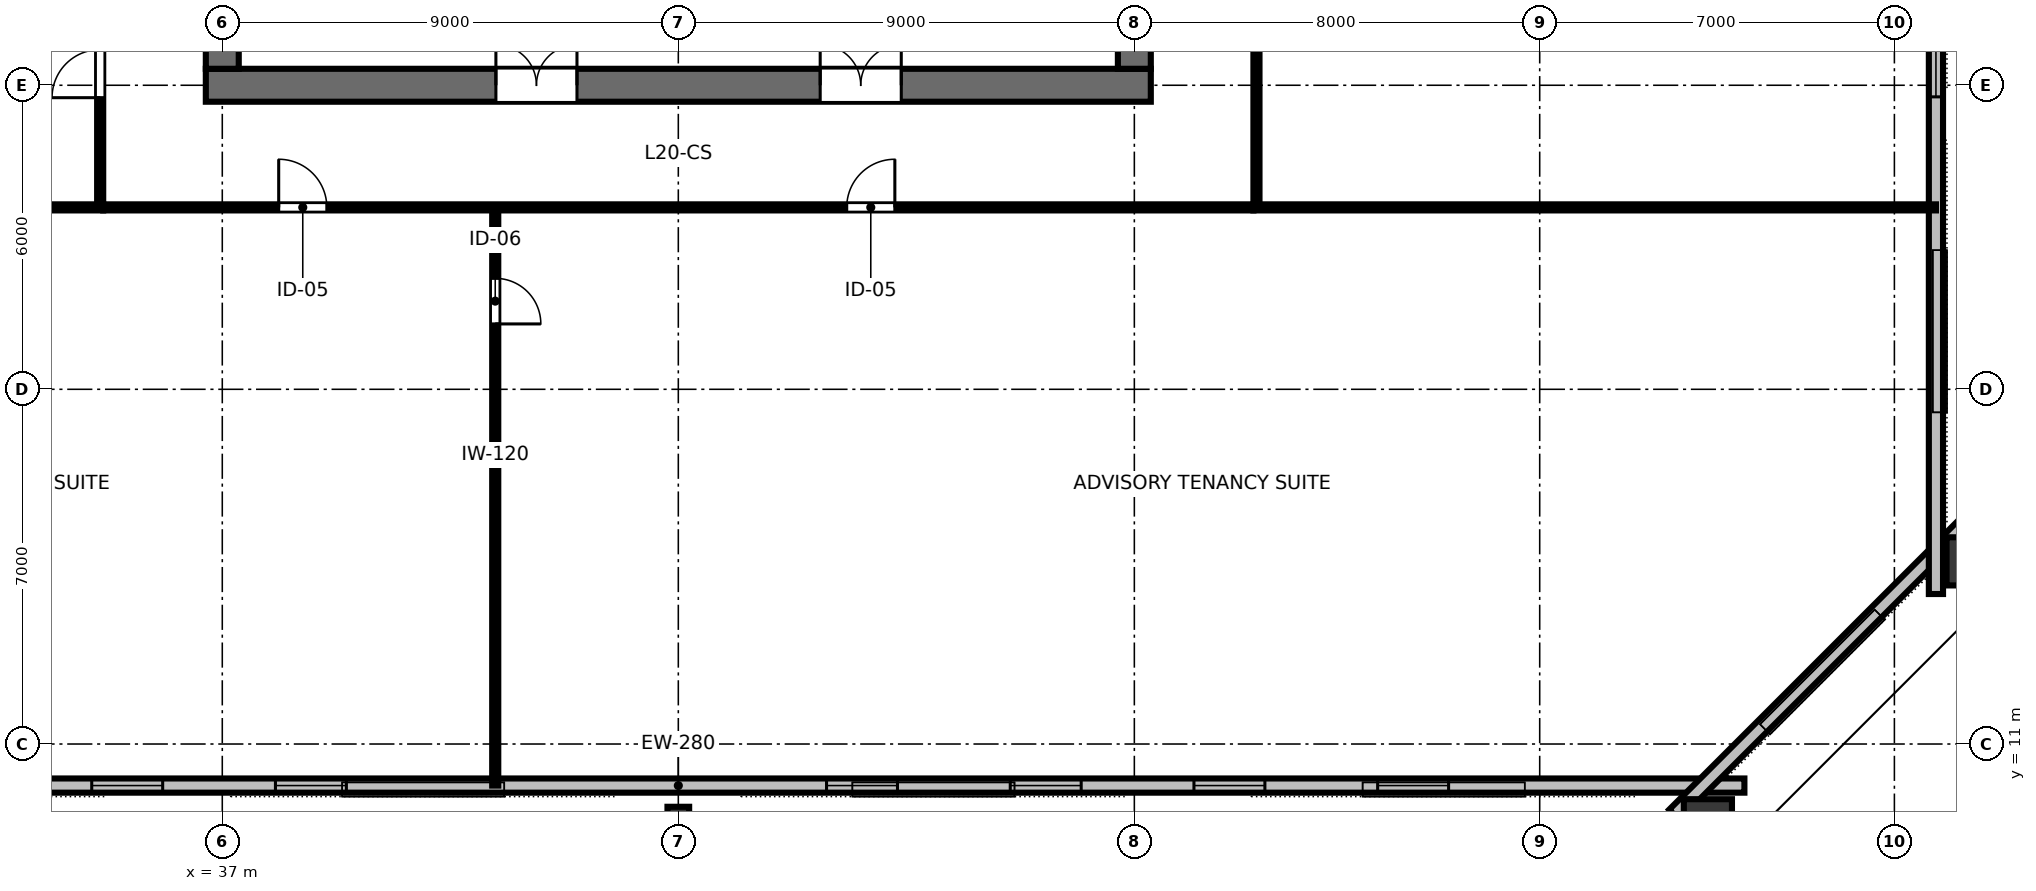
"""IFC4 building model, lengths in metres.
Left out: names, types, materials, properties, quantities, classifications, styles, units other than length and angle.
Written with IfcOpenShell. Run it as: python <this file> out.ifc"""

import sys

from ifc_helpers import new_model, si_unit, direction, frame, frame_2d, origin, origin_2d, place, context, subcontext, project, spatial, rectangle, hollow_rectangle, i_section, extrude, element, fill, save


model = new_model("IFC4")
c1 = context("Model", 3, precision=1e-05, world=origin(), true_north=direction((0.0, 1.0)))
c2 = subcontext(c1, "Body", "Model", "MODEL_VIEW")
j1 = project(units=[si_unit("LENGTHUNIT", "METRE"), si_unit("PLANEANGLEUNIT", "RADIAN")], contexts=[c1])
p1 = place(None, origin())
s1 = spatial("IfcSite", under=j1, at=p1, CompositionType="ELEMENT")
p2 = place(p1, origin())
s2 = spatial("IfcBuilding", under=s1, at=p2, CompositionType="ELEMENT")
p3 = place(p2, frame((0.0, 0.0, 78.4)))
s3 = spatial("IfcBuildingStorey", under=s2, at=p3, CompositionType="ELEMENT", Elevation=78.4)
p4 = place(p3, frame((36.675, 24.0, 0.0), z_axis=(0.0, 0.0, 1.0), x_axis=(1.0, 0.0, 0.0)))
e1 = element("IfcWall", 1, at=p4, inside=s3, PredefinedType="SHEAR", context=c2, shape_type="SweptSolid", body=[
    extrude(rectangle(XDim=18.65, YDim=0.65, at=frame_2d((9.325, 0.0))), origin(), (0.0, 0.0, 1.0), 3.36),
])
p5 = place(p4, frame((5.725, 0.0, 0.0)))
e2 = element("IfcOpeningElement", 2, at=p5, cuts=e1, PredefinedType="OPENING", context=c2, shape_type="SweptSolid", body=[
    extrude(rectangle(XDim=1.6, YDim=2.15, at=frame_2d((0.8, 1.075))), frame((0.0, 0.335, 0.0), z_axis=(0.0, -1.0, 0.0), x_axis=(1.0, 0.0, 0.0)), (0.0, 0.0, 1.0), 0.67),
])
p6 = place(p4, frame((12.125, 0.0, 0.0)))
e3 = element("IfcOpeningElement", 3, at=p6, cuts=e1, PredefinedType="OPENING", context=c2, shape_type="SweptSolid", body=[
    extrude(rectangle(XDim=1.6, YDim=2.15, at=frame_2d((0.8, 1.075))), frame((0.0, 0.335, 0.0), z_axis=(0.0, -1.0, 0.0), x_axis=(1.0, 0.0, 0.0)), (0.0, 0.0, 1.0), 0.67),
])
p7 = place(p3, frame((37.0, 24.325, 0.0), z_axis=(0.0, 0.0, 1.0), x_axis=(0.0, 1.0, 0.0)))
e4 = element("IfcWall", 4, at=p7, inside=s3, PredefinedType="SHEAR", context=c2, shape_type="SweptSolid", body=[
    extrude(rectangle(XDim=15.35, YDim=0.65, at=frame_2d((7.675, 0.0))), origin(), (0.0, 0.0, 1.0), 3.36),
])
p8 = place(p7, frame((5.2, 0.0, 0.0)))
e5 = element("IfcOpeningElement", 5, at=p8, cuts=e4, PredefinedType="OPENING", context=c2, shape_type="SweptSolid", body=[
    extrude(rectangle(XDim=1.15, YDim=2.15, at=frame_2d((0.575, 1.075))), frame((0.0, 0.335, 0.0), z_axis=(0.0, -1.0, 0.0), x_axis=(1.0, 0.0, 0.0)), (0.0, 0.0, 1.0), 0.67),
])
p9 = place(p3, frame((55.0, 24.325, 0.0), z_axis=(0.0, 0.0, 1.0), x_axis=(0.0, 1.0, 0.0)))
e6 = element("IfcWall", 6, at=p9, inside=s3, PredefinedType="SHEAR", context=c2, shape_type="SweptSolid", body=[
    extrude(rectangle(XDim=15.35, YDim=0.65, at=frame_2d((7.675, 0.0))), origin(), (0.0, 0.0, 1.0), 3.36),
])
p10 = place(p9, frame((5.2, 0.0, 0.0)))
e7 = element("IfcOpeningElement", 7, at=p10, cuts=e6, PredefinedType="OPENING", context=c2, shape_type="SweptSolid", body=[
    extrude(rectangle(XDim=1.15, YDim=2.15, at=frame_2d((0.575, 1.075))), frame((0.0, 0.335, 0.0), z_axis=(0.0, -1.0, 0.0), x_axis=(1.0, 0.0, 0.0)), (0.0, 0.0, 1.0), 0.67),
])
p11 = place(p3, frame((46.0, 9.52, 0.0), z_axis=(0.0, 0.161641018094, 0.986849624446), x_axis=(-1.0, 0.0, 0.0)))
e8 = element("IfcColumn", 8, at=p11, inside=s3, PredefinedType="COLUMN", context=c2, shape_type="SweptSolid", body=[
    extrude(i_section(OverallWidth=0.428, OverallDepth=0.483, WebThickness=0.051, FlangeThickness=0.082, FilletRadius=0.025, at=origin_2d()), origin(), (0.0, 0.0, 1.0), 3.403),
])
p12 = place(p3, frame((66.319, 9.336, 0.0), z_axis=(-0.227706652534, 0.158346926777, 0.960768406627), x_axis=(-0.570924282853, -0.821002718174, 0.0)))
e9 = element("IfcColumn", 9, at=p12, inside=s3, PredefinedType="COLUMN", context=c2, shape_type="SweptSolid", body=[
    extrude(hollow_rectangle(XDim=0.95, YDim=1.15, WallThickness=0.06, at=origin_2d()), origin(), (0.0, 0.0, 1.0), 3.495),
])
p13 = place(p3, frame((71.604, 14.604, 0.0), z_axis=(-0.186998264307, 0.199376234682, 0.961915155401), x_axis=(0.658048855079, -0.701607062764, 0.273348191525)))
e10 = element("IfcColumn", 10, at=p13, inside=s3, PredefinedType="COLUMN", context=c2, shape_type="SweptSolid", body=[
    extrude(hollow_rectangle(XDim=0.95, YDim=1.15, WallThickness=0.06, at=origin_2d()), origin(), (0.0, 0.0, 1.0), 3.491),
])
p14 = place(p3, frame((24.96, 10.18, 0.0), z_axis=(0.0, 0.0, 1.0), x_axis=(1.0, 0.0, 0.0)))
e11 = element("IfcWall", 11, at=p14, inside=s3, PredefinedType="STANDARD", context=c2, shape_type="SweptSolid", body=[
    extrude(rectangle(XDim=42.08, YDim=0.28, at=frame_2d((21.04, 0.0))), origin(), (0.0, 0.0, 1.0), 2.662),
])
p15 = place(p14, frame((5.838, 0.0, 0.85)))
e12 = element("IfcOpeningElement", 12, at=p15, cuts=e11, PredefinedType="OPENING", context=c2, shape_type="SweptSolid", body=[
    extrude(rectangle(XDim=1.4, YDim=1.2, at=frame_2d((0.7, 0.6))), frame((0.0, 0.15, 0.0), z_axis=(0.0, -1.0, 0.0), x_axis=(1.0, 0.0, 0.0)), (0.0, 0.0, 1.0), 0.3),
])
p16 = place(p14, frame((9.464, 0.0, 0.85)))
e13 = element("IfcOpeningElement", 13, at=p16, cuts=e11, PredefinedType="OPENING", context=c2, shape_type="SweptSolid", body=[
    extrude(rectangle(XDim=1.4, YDim=1.2, at=frame_2d((0.7, 0.6))), frame((0.0, 0.15, 0.0), z_axis=(0.0, -1.0, 0.0), x_axis=(1.0, 0.0, 0.0)), (0.0, 0.0, 1.0), 0.3),
])
p17 = place(p14, frame((13.089, 0.0, 0.85)))
e14 = element("IfcOpeningElement", 14, at=p17, cuts=e11, PredefinedType="OPENING", context=c2, shape_type="SweptSolid", body=[
    extrude(rectangle(XDim=1.4, YDim=1.2, at=frame_2d((0.7, 0.6))), frame((0.0, 0.15, 0.0), z_axis=(0.0, -1.0, 0.0), x_axis=(1.0, 0.0, 0.0)), (0.0, 0.0, 1.0), 0.3),
])
p18 = place(p14, frame((23.966, 0.0, 0.85)))
e15 = element("IfcOpeningElement", 15, at=p18, cuts=e11, PredefinedType="OPENING", context=c2, shape_type="SweptSolid", body=[
    extrude(rectangle(XDim=1.4, YDim=1.2, at=frame_2d((0.7, 0.6))), frame((0.0, 0.15, 0.0), z_axis=(0.0, -1.0, 0.0), x_axis=(1.0, 0.0, 0.0)), (0.0, 0.0, 1.0), 0.3),
])
p19 = place(p14, frame((27.591, 0.0, 0.85)))
e16 = element("IfcOpeningElement", 16, at=p19, cuts=e11, PredefinedType="OPENING", context=c2, shape_type="SweptSolid", body=[
    extrude(rectangle(XDim=1.4, YDim=1.2, at=frame_2d((0.7, 0.6))), frame((0.0, 0.15, 0.0), z_axis=(0.0, -1.0, 0.0), x_axis=(1.0, 0.0, 0.0)), (0.0, 0.0, 1.0), 0.3),
])
p20 = place(p14, frame((31.216, 0.0, 0.85)))
e17 = element("IfcOpeningElement", 17, at=p20, cuts=e11, PredefinedType="OPENING", context=c2, shape_type="SweptSolid", body=[
    extrude(rectangle(XDim=1.4, YDim=1.2, at=frame_2d((0.7, 0.6))), frame((0.0, 0.15, 0.0), z_axis=(0.0, -1.0, 0.0), x_axis=(1.0, 0.0, 0.0)), (0.0, 0.0, 1.0), 0.3),
])
p21 = place(p14, frame((34.842, 0.0, 0.85)))
e18 = element("IfcOpeningElement", 18, at=p21, cuts=e11, PredefinedType="OPENING", context=c2, shape_type="SweptSolid", body=[
    extrude(rectangle(XDim=1.4, YDim=1.2, at=frame_2d((0.7, 0.6))), frame((0.0, 0.15, 0.0), z_axis=(0.0, -1.0, 0.0), x_axis=(1.0, 0.0, 0.0)), (0.0, 0.0, 1.0), 0.3),
])
p22 = place(p3, frame((65.655, 9.606, 0.0), z_axis=(0.0, 0.0, 1.0), x_axis=(0.707106781187, 0.707106781187, 0.0)))
e19 = element("IfcWall", 19, at=p22, inside=s3, PredefinedType="STANDARD", context=c2, shape_type="SweptSolid", body=[
    extrude(rectangle(XDim=8.116, YDim=0.28, at=frame_2d((4.058, 0.0))), origin(), (0.0, 0.0, 1.0), 2.662),
])
p23 = place(p3, frame((70.82, 13.96, 0.0), z_axis=(0.0, 0.0, 1.0), x_axis=(0.0, 1.0, 0.0)))
e20 = element("IfcWall", 20, at=p23, inside=s3, PredefinedType="STANDARD", context=c2, shape_type="SweptSolid", body=[
    extrude(rectangle(XDim=36.08, YDim=0.28, at=frame_2d((18.04, 0.0))), origin(), (0.0, 0.0, 1.0), 2.662),
])
p24 = place(p23, frame((9.811, 0.0, 0.85)))
e21 = element("IfcOpeningElement", 21, at=p24, cuts=e20, PredefinedType="OPENING", context=c2, shape_type="SweptSolid", body=[
    extrude(rectangle(XDim=1.4, YDim=1.2, at=frame_2d((0.7, 0.6))), frame((0.0, 0.15, 0.0), z_axis=(0.0, -1.0, 0.0), x_axis=(1.0, 0.0, 0.0)), (0.0, 0.0, 1.0), 0.3),
])
p25 = place(p23, frame((13.576, 0.0, 0.85)))
e22 = element("IfcOpeningElement", 22, at=p25, cuts=e20, PredefinedType="OPENING", context=c2, shape_type="SweptSolid", body=[
    extrude(rectangle(XDim=1.4, YDim=1.2, at=frame_2d((0.7, 0.6))), frame((0.0, 0.15, 0.0), z_axis=(0.0, -1.0, 0.0), x_axis=(1.0, 0.0, 0.0)), (0.0, 0.0, 1.0), 0.3),
])
p26 = place(p23, frame((21.104, 0.0, 0.85)))
e23 = element("IfcOpeningElement", 23, at=p26, cuts=e20, PredefinedType="OPENING", context=c2, shape_type="SweptSolid", body=[
    extrude(rectangle(XDim=1.4, YDim=1.2, at=frame_2d((0.7, 0.6))), frame((0.0, 0.15, 0.0), z_axis=(0.0, -1.0, 0.0), x_axis=(1.0, 0.0, 0.0)), (0.0, 0.0, 1.0), 0.3),
])
p27 = place(p23, frame((24.869, 0.0, 0.85)))
e24 = element("IfcOpeningElement", 24, at=p27, cuts=e20, PredefinedType="OPENING", context=c2, shape_type="SweptSolid", body=[
    extrude(rectangle(XDim=1.4, YDim=1.2, at=frame_2d((0.7, 0.6))), frame((0.0, 0.15, 0.0), z_axis=(0.0, -1.0, 0.0), x_axis=(1.0, 0.0, 0.0)), (0.0, 0.0, 1.0), 0.3),
])
p28 = place(p3, frame((42.387, 21.59, 0.0), z_axis=(0.0, 0.0, 1.0), x_axis=(0.0, -1.0, 0.0)))
e25 = element("IfcWall", 25, at=p28, inside=s3, PredefinedType="PARTITIONING", context=c2, shape_type="SweptSolid", body=[
    extrude(rectangle(XDim=11.41, YDim=0.12, at=frame_2d((5.705, 0.0))), origin(), (0.0, 0.0, 1.0), 2.64),
])
p29 = place(p28, frame((1.4, 0.0, 0.0)))
e26 = element("IfcOpeningElement", 26, at=p29, cuts=e25, PredefinedType="OPENING", context=c2, shape_type="SweptSolid", body=[
    extrude(rectangle(XDim=0.9, YDim=2.15, at=frame_2d((0.45, 1.075))), frame((0.0, 0.07, 0.0), z_axis=(0.0, -1.0, 0.0), x_axis=(1.0, 0.0, 0.0)), (0.0, 0.0, 1.0), 0.14),
])
p30 = place(p3, frame((34.65, 21.59, 0.0), z_axis=(0.0, 0.0, 1.0), x_axis=(1.0, 0.0, 0.0)))
e27 = element("IfcWall", 27, at=p30, inside=s3, PredefinedType="PARTITIONING", context=c2, shape_type="SweptSolid", body=[
    extrude(rectangle(XDim=22.7, YDim=0.12, at=frame_2d((11.35, 0.0))), origin(), (0.0, 0.0, 1.0), 2.64),
])
p31 = place(p30, frame((3.463, 0.0, 0.0)))
e28 = element("IfcOpeningElement", 28, at=p31, cuts=e27, PredefinedType="OPENING", context=c2, shape_type="SweptSolid", body=[
    extrude(rectangle(XDim=0.95, YDim=2.15, at=frame_2d((0.475, 1.075))), frame((0.0, 0.07, 0.0), z_axis=(0.0, -1.0, 0.0), x_axis=(1.0, 0.0, 0.0)), (0.0, 0.0, 1.0), 0.14),
])
p32 = place(p30, frame((14.673, 0.0, 0.0)))
e29 = element("IfcOpeningElement", 29, at=p32, cuts=e27, PredefinedType="OPENING", context=c2, shape_type="SweptSolid", body=[
    extrude(rectangle(XDim=0.95, YDim=2.15, at=frame_2d((0.475, 1.075))), frame((0.0, 0.07, 0.0), z_axis=(0.0, -1.0, 0.0), x_axis=(1.0, 0.0, 0.0)), (0.0, 0.0, 1.0), 0.14),
])
p33 = place(p3, frame((34.59, 21.65, 0.0), z_axis=(0.0, 0.0, 1.0), x_axis=(0.0, 1.0, 0.0)))
e30 = element("IfcWall", 30, at=p33, inside=s3, PredefinedType="PARTITIONING", context=c2, shape_type="SweptSolid", body=[
    extrude(rectangle(XDim=20.7, YDim=0.12, at=frame_2d((10.35, 0.0))), origin(), (0.0, 0.0, 1.0), 2.64),
])
p34 = place(p33, frame((2.105, 0.0, 0.0)))
e31 = element("IfcOpeningElement", 31, at=p34, cuts=e30, PredefinedType="OPENING", context=c2, shape_type="SweptSolid", body=[
    extrude(rectangle(XDim=0.95, YDim=2.15, at=frame_2d((0.475, 1.075))), frame((0.0, 0.07, 0.0), z_axis=(0.0, -1.0, 0.0), x_axis=(1.0, 0.0, 0.0)), (0.0, 0.0, 1.0), 0.14),
])
p35 = place(p33, frame((7.369, 0.0, 0.0)))
e32 = element("IfcOpeningElement", 32, at=p35, cuts=e30, PredefinedType="OPENING", context=c2, shape_type="SweptSolid", body=[
    extrude(rectangle(XDim=0.95, YDim=2.15, at=frame_2d((0.475, 1.075))), frame((0.0, 0.07, 0.0), z_axis=(0.0, -1.0, 0.0), x_axis=(1.0, 0.0, 0.0)), (0.0, 0.0, 1.0), 0.14),
])
p36 = place(p33, frame((15.139, 0.0, 0.0)))
e33 = element("IfcOpeningElement", 33, at=p36, cuts=e30, PredefinedType="OPENING", context=c2, shape_type="SweptSolid", body=[
    extrude(rectangle(XDim=0.95, YDim=2.15, at=frame_2d((0.475, 1.075))), frame((0.0, 0.07, 0.0), z_axis=(0.0, -1.0, 0.0), x_axis=(1.0, 0.0, 0.0)), (0.0, 0.0, 1.0), 0.14),
])
p37 = place(p3, frame((57.41, 21.65, 0.0), z_axis=(0.0, 0.0, 1.0), x_axis=(0.0, 1.0, 0.0)))
e34 = element("IfcWall", 34, at=p37, inside=s3, PredefinedType="PARTITIONING", context=c2, shape_type="SweptSolid", body=[
    extrude(rectangle(XDim=20.7, YDim=0.12, at=frame_2d((10.35, 0.0))), origin(), (0.0, 0.0, 1.0), 2.64),
])
p38 = place(p37, frame((4.931, 0.0, 0.0)))
e35 = element("IfcOpeningElement", 35, at=p38, cuts=e34, PredefinedType="OPENING", context=c2, shape_type="SweptSolid", body=[
    extrude(rectangle(XDim=0.95, YDim=2.15, at=frame_2d((0.475, 1.075))), frame((0.0, 0.07, 0.0), z_axis=(0.0, -1.0, 0.0), x_axis=(1.0, 0.0, 0.0)), (0.0, 0.0, 1.0), 0.14),
])
p39 = place(p37, frame((15.081, 0.0, 0.0)))
e36 = element("IfcOpeningElement", 36, at=p39, cuts=e34, PredefinedType="OPENING", context=c2, shape_type="SweptSolid", body=[
    extrude(rectangle(XDim=0.95, YDim=2.15, at=frame_2d((0.475, 1.075))), frame((0.0, 0.07, 0.0), z_axis=(0.0, -1.0, 0.0), x_axis=(1.0, 0.0, 0.0)), (0.0, 0.0, 1.0), 0.14),
])
for number, where, z_axis, x_axis in (
    (37, (34.65, 21.59, 0.0), (0.0, 0.0, 1.0), (-1.0, 0.0, 0.0)),
    (38, (57.35, 21.59, 0.0), (0.0, 0.0, 1.0), (1.0, 0.0, 0.0)),
):
    element("IfcWall", number, at=place(p3, frame(where, z_axis=z_axis, x_axis=x_axis)), inside=s3, PredefinedType="PARTITIONING", context=c2, shape_type="SweptSolid", body=[
        extrude(rectangle(XDim=13.47, YDim=0.12, at=frame_2d((6.735, 0.0))), origin(), (0.0, 0.0, 1.0), 2.64),
    ])
p40 = place(p16, origin())
e39 = element("IfcWindow", 39, at=p40, inside=s3, PartitioningType="SINGLE_PANEL", PredefinedType="WINDOW", context=c2, shape_type="SweptSolid", body=[
    extrude(rectangle(XDim=1.4, YDim=1.2, at=frame_2d((0.7, 0.6))), frame((0.0, 0.03, 0.0), z_axis=(0.0, -1.0, 0.0), x_axis=(1.0, 0.0, 0.0)), (0.0, 0.0, 1.0), 0.06),
])
fill(e13, e39)
p41 = place(p17, origin())
e40 = element("IfcWindow", 40, at=p41, inside=s3, PartitioningType="SINGLE_PANEL", PredefinedType="WINDOW", context=c2, shape_type="SweptSolid", body=[
    extrude(rectangle(XDim=1.4, YDim=1.2, at=frame_2d((0.7, 0.6))), frame((0.0, 0.03, 0.0), z_axis=(0.0, -1.0, 0.0), x_axis=(1.0, 0.0, 0.0)), (0.0, 0.0, 1.0), 0.06),
])
fill(e14, e40)
p42 = place(p18, origin())
e41 = element("IfcWindow", 41, at=p42, inside=s3, PartitioningType="SINGLE_PANEL", PredefinedType="WINDOW", context=c2, shape_type="SweptSolid", body=[
    extrude(rectangle(XDim=1.4, YDim=1.2, at=frame_2d((0.7, 0.6))), frame((0.0, 0.03, 0.0), z_axis=(0.0, -1.0, 0.0), x_axis=(1.0, 0.0, 0.0)), (0.0, 0.0, 1.0), 0.06),
])
fill(e15, e41)
p43 = place(p19, origin())
e42 = element("IfcWindow", 42, at=p43, inside=s3, PartitioningType="SINGLE_PANEL", PredefinedType="WINDOW", context=c2, shape_type="SweptSolid", body=[
    extrude(rectangle(XDim=1.4, YDim=1.2, at=frame_2d((0.7, 0.6))), frame((0.0, 0.03, 0.0), z_axis=(0.0, -1.0, 0.0), x_axis=(1.0, 0.0, 0.0)), (0.0, 0.0, 1.0), 0.06),
])
fill(e16, e42)
p44 = place(p20, origin())
e43 = element("IfcWindow", 43, at=p44, inside=s3, PartitioningType="SINGLE_PANEL", PredefinedType="WINDOW", context=c2, shape_type="SweptSolid", body=[
    extrude(rectangle(XDim=1.4, YDim=1.2, at=frame_2d((0.7, 0.6))), frame((0.0, 0.03, 0.0), z_axis=(0.0, -1.0, 0.0), x_axis=(1.0, 0.0, 0.0)), (0.0, 0.0, 1.0), 0.06),
])
fill(e17, e43)
p45 = place(p21, origin())
e44 = element("IfcWindow", 44, at=p45, inside=s3, PartitioningType="SINGLE_PANEL", PredefinedType="WINDOW", context=c2, shape_type="SweptSolid", body=[
    extrude(rectangle(XDim=1.4, YDim=1.2, at=frame_2d((0.7, 0.6))), frame((0.0, 0.03, 0.0), z_axis=(0.0, -1.0, 0.0), x_axis=(1.0, 0.0, 0.0)), (0.0, 0.0, 1.0), 0.06),
])
fill(e18, e44)
p46 = place(p24, origin())
e45 = element("IfcWindow", 45, at=p46, inside=s3, PartitioningType="SINGLE_PANEL", PredefinedType="WINDOW", context=c2, shape_type="SweptSolid", body=[
    extrude(rectangle(XDim=1.4, YDim=1.2, at=frame_2d((0.7, 0.6))), frame((0.0, 0.03, 0.0), z_axis=(0.0, -1.0, 0.0), x_axis=(1.0, 0.0, 0.0)), (0.0, 0.0, 1.0), 0.06),
])
fill(e21, e45)
p47 = place(p5, origin())
e46 = element("IfcDoor", 46, at=p47, inside=s3, OperationType="DOUBLE_DOOR_SINGLE_SWING", PredefinedType="DOOR", context=c2, shape_type="SweptSolid", body=[
    extrude(rectangle(XDim=1.6, YDim=2.15, at=frame_2d((0.8, 1.075))), frame((0.0, 0.025, 0.0), z_axis=(0.0, -1.0, 0.0), x_axis=(1.0, 0.0, 0.0)), (0.0, 0.0, 1.0), 0.05),
])
fill(e2, e46)
p48 = place(p6, origin())
e47 = element("IfcDoor", 47, at=p48, inside=s3, OperationType="DOUBLE_DOOR_SINGLE_SWING", PredefinedType="DOOR", context=c2, shape_type="SweptSolid", body=[
    extrude(rectangle(XDim=1.6, YDim=2.15, at=frame_2d((0.8, 1.075))), frame((0.0, 0.025, 0.0), z_axis=(0.0, -1.0, 0.0), x_axis=(1.0, 0.0, 0.0)), (0.0, 0.0, 1.0), 0.05),
])
fill(e3, e47)
p49 = place(p29, origin())
e48 = element("IfcDoor", 48, at=p49, inside=s3, OperationType="SINGLE_SWING_RIGHT", PredefinedType="DOOR", context=c2, shape_type="SweptSolid", body=[
    extrude(rectangle(XDim=0.9, YDim=2.15, at=frame_2d((0.45, 1.075))), frame((0.0, 0.025, 0.0), z_axis=(0.0, -1.0, 0.0), x_axis=(1.0, 0.0, 0.0)), (0.0, 0.0, 1.0), 0.05),
])
fill(e26, e48)
p50 = place(p31, origin())
e49 = element("IfcDoor", 49, at=p50, inside=s3, OperationType="SINGLE_SWING_LEFT", PredefinedType="DOOR", context=c2, shape_type="SweptSolid", body=[
    extrude(rectangle(XDim=0.95, YDim=2.15, at=frame_2d((0.475, 1.075))), frame((0.0, 0.025, 0.0), z_axis=(0.0, -1.0, 0.0), x_axis=(1.0, 0.0, 0.0)), (0.0, 0.0, 1.0), 0.05),
])
fill(e28, e49)
p51 = place(p32, origin())
e50 = element("IfcDoor", 50, at=p51, inside=s3, OperationType="SINGLE_SWING_RIGHT", PredefinedType="DOOR", context=c2, shape_type="SweptSolid", body=[
    extrude(rectangle(XDim=0.95, YDim=2.15, at=frame_2d((0.475, 1.075))), frame((0.0, 0.025, 0.0), z_axis=(0.0, -1.0, 0.0), x_axis=(1.0, 0.0, 0.0)), (0.0, 0.0, 1.0), 0.05),
])
fill(e29, e50)
p52 = place(p34, origin())
e51 = element("IfcDoor", 51, at=p52, inside=s3, OperationType="SINGLE_SWING_LEFT", PredefinedType="DOOR", context=c2, shape_type="SweptSolid", body=[
    extrude(rectangle(XDim=0.95, YDim=2.15, at=frame_2d((0.475, 1.075))), frame((0.0, 0.025, 0.0), z_axis=(0.0, -1.0, 0.0), x_axis=(1.0, 0.0, 0.0)), (0.0, 0.0, 1.0), 0.05),
])
fill(e31, e51)
save(model, sys.argv[1])
